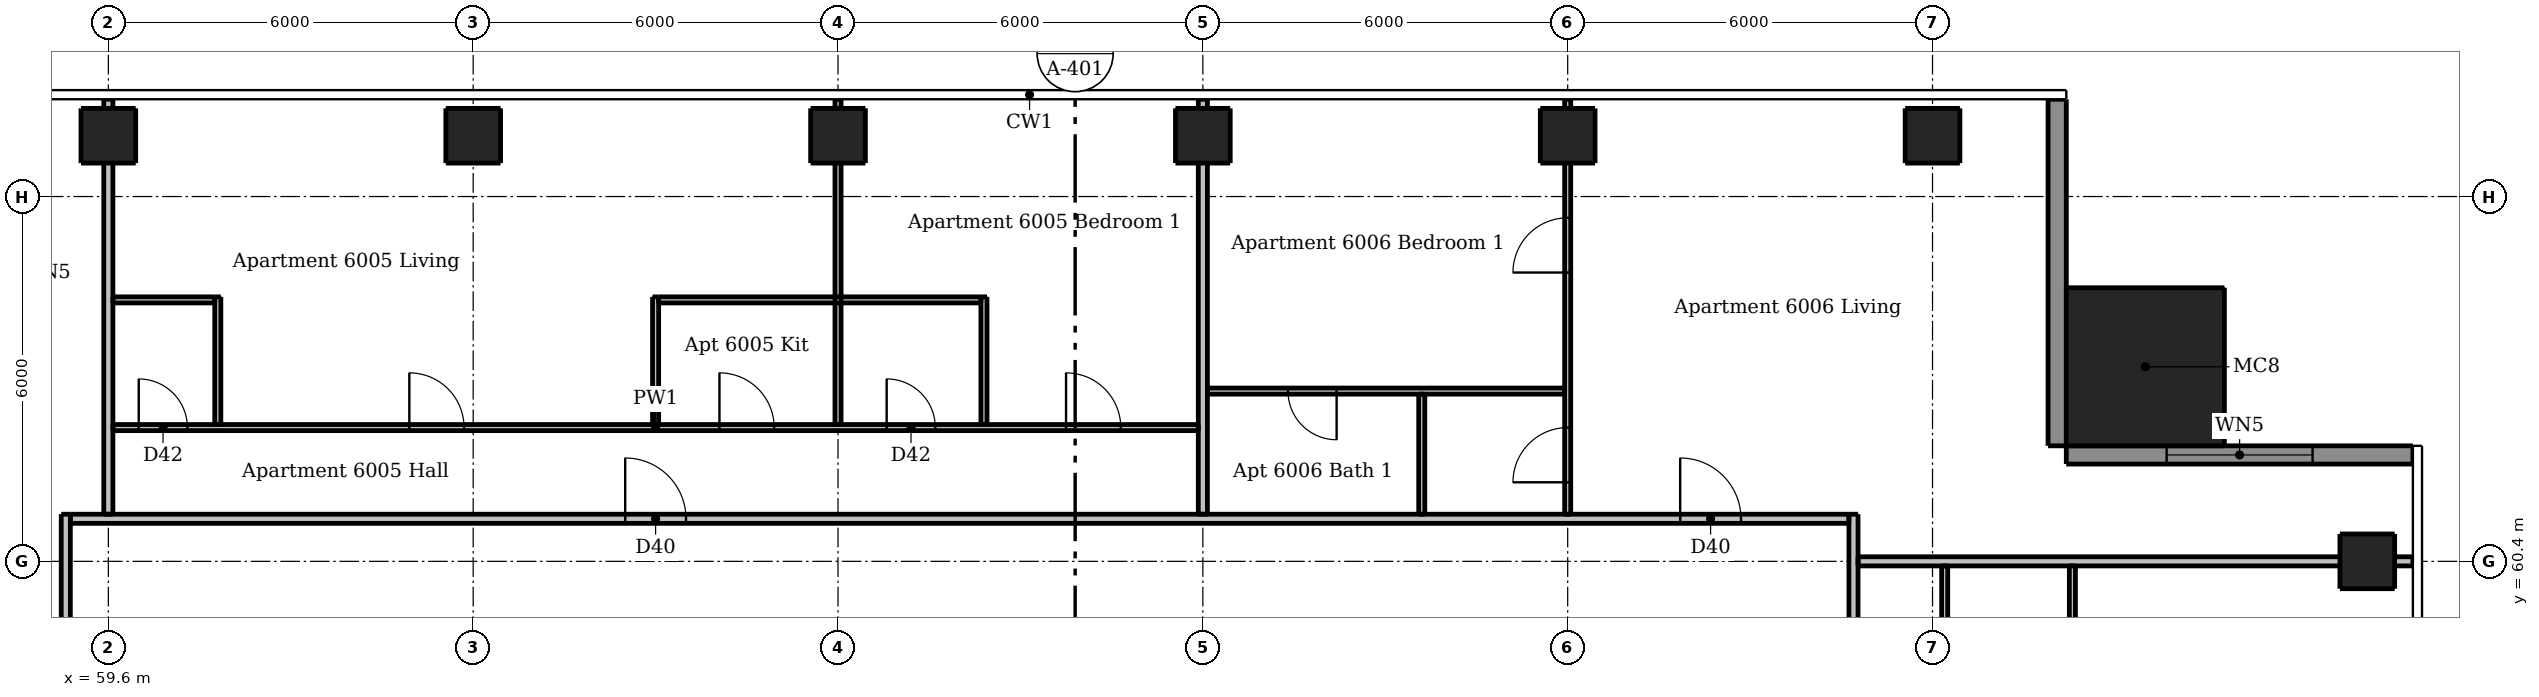
"""IFC4 building model, lengths in metres.
Left out: names, types, materials, properties, quantities, classifications, styles, units other than length and angle.
Written with IfcOpenShell. Run it as: python <this file> out.ifc"""

import sys

from ifc_helpers import new_model, si_unit, direction, frame, frame_2d, origin, origin_2d, place, context, subcontext, project, spatial, rectangle, extrude, element, fill, save


model = new_model("IFC4")
c1 = context("Model", 3, precision=1e-05, world=origin(), true_north=direction((0.0, 1.0)))
c2 = subcontext(c1, "Body", "Model", "MODEL_VIEW")
j1 = project(units=[si_unit("LENGTHUNIT", "METRE"), si_unit("PLANEANGLEUNIT", "RADIAN")], contexts=[c1])
p1 = place(None, origin())
s1 = spatial("IfcSite", under=j1, at=p1, CompositionType="ELEMENT")
p2 = place(p1, origin())
s2 = spatial("IfcBuilding", under=s1, at=p2, CompositionType="ELEMENT")
p3 = place(p2, frame((0.0, 0.0, 223.3)))
s3 = spatial("IfcBuildingStorey", under=s2, at=p3, CompositionType="ELEMENT", Elevation=223.3)
for number, where, z_axis, x_axis in (
    (1, (96.75, 60.4, 0.0), (0.0, 0.0, 1.0), (1.0, 0.0, 0.0)),
    (2, (59.6, 67.4, 0.0), (0.0, 0.0, 1.0), (1.0, 0.0, 0.0)),
    (3, (65.6, 67.4, 0.0), (0.0, 0.0, 1.0), (1.0, 0.0, 0.0)),
    (4, (71.6, 67.4, 0.0), (0.0, 0.0, 1.0), (1.0, 0.0, 0.0)),
    (5, (77.6, 67.4, 0.0), (0.0, 0.0, 1.0), (1.0, 0.0, 0.0)),
    (6, (83.6, 67.4, 0.0), (0.0, 0.0, 1.0), (1.0, 0.0, 0.0)),
    (7, (89.6, 67.4, 0.0), (0.0, 0.0, 1.0), (1.0, 0.0, 0.0)),
):
    element("IfcColumn", number, at=place(p3, frame(where, z_axis=z_axis, x_axis=x_axis)), inside=s3, PredefinedType="COLUMN", context=c2, shape_type="SweptSolid", body=[
        extrude(rectangle(XDim=0.9, YDim=0.9, at=origin_2d()), origin(), (0.0, 0.0, 1.0), 3.05),
    ])
p4 = place(p3, frame((93.1, 63.6, 0.0), z_axis=(0.0, 0.0, 1.0), x_axis=(1.0, 0.0, 0.0)))
e8 = element("IfcColumn", 8, at=p4, inside=s3, PredefinedType="COLUMN", context=c2, shape_type="SweptSolid", body=[
    extrude(rectangle(XDim=2.6, YDim=2.6, at=origin_2d()), origin(), (0.0, 0.0, 1.0), 3.3),
])
p5 = place(p3, frame((97.5, 62.15, 0.0), z_axis=(0.0, 0.0, 1.0), x_axis=(-1.0, 0.0, 0.0)))
e9 = element("IfcWall", 9, at=p5, inside=s3, PredefinedType="SOLIDWALL", context=c2, shape_type="SweptSolid", body=[
    extrude(rectangle(XDim=5.7, YDim=0.3, at=frame_2d((2.85, 0.0))), origin(), (0.0, 0.0, 1.0), 3.05),
])
p6 = place(p5, frame((1.65, 0.0, 0.15)))
e10 = element("IfcOpeningElement", 10, at=p6, cuts=e9, PredefinedType="OPENING", context=c2, shape_type="SweptSolid", body=[
    extrude(rectangle(XDim=2.4, YDim=2.1, at=frame_2d((1.2, 1.05))), frame((0.0, 0.16, 0.0), z_axis=(0.0, -1.0, 0.0), x_axis=(1.0, 0.0, 0.0)), (0.0, 0.0, 1.0), 0.32),
])
p7 = place(p3, frame((91.65, 62.3, 0.0), z_axis=(0.0, 0.0, 1.0), x_axis=(0.0, 1.0, 0.0)))
e11 = element("IfcWall", 11, at=p7, inside=s3, PredefinedType="SOLIDWALL", context=c2, shape_type="SweptSolid", body=[
    extrude(rectangle(XDim=5.7, YDim=0.3, at=frame_2d((2.85, 0.0))), origin(), (0.0, 0.0, 1.0), 3.05),
])
for number, where, z_axis, x_axis in (
    (12, (61.4, 62.65, 0.0), (0.0, 0.0, 1.0), (0.0, 1.0, 0.0)),
    (13, (68.6, 62.65, 0.0), (0.0, 0.0, 1.0), (0.0, 1.0, 0.0)),
):
    element("IfcWall", number, at=place(p3, frame(where, z_axis=z_axis, x_axis=x_axis)), inside=s3, PredefinedType="PARTITIONING", context=c2, shape_type="SweptSolid", body=[
        extrude(rectangle(XDim=2.1, YDim=0.1, at=frame_2d((1.05, 0.0))), origin(), (0.0, 0.0, 1.0), 3.05),
    ])
p8 = place(p3, frame((71.6, 62.65, 0.0), z_axis=(0.0, 0.0, 1.0), x_axis=(0.0, 1.0, 0.0)))
e14 = element("IfcWall", 14, at=p8, inside=s3, PredefinedType="PARTITIONING", context=c2, shape_type="SweptSolid", body=[
    extrude(rectangle(XDim=5.35, YDim=0.1, at=frame_2d((2.675, 0.0))), origin(), (0.0, 0.0, 1.0), 2.516),
])
p9 = place(p3, frame((74.0, 62.65, 0.0), z_axis=(0.0, 0.0, 1.0), x_axis=(0.0, 1.0, 0.0)))
e15 = element("IfcWall", 15, at=p9, inside=s3, PredefinedType="PARTITIONING", context=c2, shape_type="SweptSolid", body=[
    extrude(rectangle(XDim=2.1, YDim=0.1, at=frame_2d((1.05, 0.0))), origin(), (0.0, 0.0, 1.0), 3.05),
])
p10 = place(p3, frame((81.2, 61.175, 0.0), z_axis=(0.0, 0.0, 1.0), x_axis=(0.0, 1.0, 0.0)))
e16 = element("IfcWall", 16, at=p10, inside=s3, PredefinedType="PARTITIONING", context=c2, shape_type="SweptSolid", body=[
    extrude(rectangle(XDim=1.975, YDim=0.1, at=frame_2d((0.987, 0.0))), origin(), (0.0, 0.0, 1.0), 3.05),
])
p11 = place(p3, frame((83.6, 61.175, 0.0), z_axis=(0.0, 0.0, 1.0), x_axis=(0.0, 1.0, 0.0)))
e17 = element("IfcWall", 17, at=p11, inside=s3, PredefinedType="PARTITIONING", context=c2, shape_type="SweptSolid", body=[
    extrude(rectangle(XDim=6.825, YDim=0.1, at=frame_2d((3.413, 0.0))), origin(), (0.0, 0.0, 1.0), 2.516),
])
p12 = place(p11, frame((0.525, 0.0, 0.0)))
e18 = element("IfcOpeningElement", 18, at=p12, cuts=e17, PredefinedType="OPENING", context=c2, shape_type="SweptSolid", body=[
    extrude(rectangle(XDim=0.9, YDim=2.1, at=frame_2d((0.45, 1.05))), frame((0.0, 0.06, 0.0), z_axis=(0.0, -1.0, 0.0), x_axis=(1.0, 0.0, 0.0)), (0.0, 0.0, 1.0), 0.12),
])
p13 = place(p11, frame((3.975, 0.0, 0.0)))
e19 = element("IfcOpeningElement", 19, at=p13, cuts=e17, PredefinedType="OPENING", context=c2, shape_type="SweptSolid", body=[
    extrude(rectangle(XDim=0.9, YDim=2.1, at=frame_2d((0.45, 1.05))), frame((0.0, 0.06, 0.0), z_axis=(0.0, -1.0, 0.0), x_axis=(1.0, 0.0, 0.0)), (0.0, 0.0, 1.0), 0.12),
])
p14 = place(p3, frame((89.8, 60.325, 0.0), z_axis=(0.0, 0.0, 1.0), x_axis=(0.0, -1.0, 0.0)))
e20 = element("IfcWall", 20, at=p14, inside=s3, PredefinedType="PARTITIONING", context=c2, shape_type="SweptSolid", body=[
    extrude(rectangle(XDim=20.85, YDim=0.1, at=frame_2d((10.425, 0.0))), origin(), (0.0, 0.0, 1.0), 3.05),
])
p15 = place(p14, frame((6.075, 0.0, 0.0)))
e21 = element("IfcOpeningElement", 21, at=p15, cuts=e20, PredefinedType="OPENING", context=c2, shape_type="SweptSolid", body=[
    extrude(rectangle(XDim=0.9, YDim=2.1, at=frame_2d((0.45, 1.05))), frame((0.0, 0.06, 0.0), z_axis=(0.0, -1.0, 0.0), x_axis=(1.0, 0.0, 0.0)), (0.0, 0.0, 1.0), 0.12),
])
p16 = place(p14, frame((0.975, 0.0, 0.0)))
e22 = element("IfcOpeningElement", 22, at=p16, cuts=e20, PredefinedType="OPENING", context=c2, shape_type="SweptSolid", body=[
    extrude(rectangle(XDim=0.9, YDim=2.1, at=frame_2d((0.45, 1.05))), frame((0.0, 0.06, 0.0), z_axis=(0.0, -1.0, 0.0), x_axis=(1.0, 0.0, 0.0)), (0.0, 0.0, 1.0), 0.12),
])
p17 = place(p14, frame((10.625, 0.0, 0.0)))
e23 = element("IfcOpeningElement", 23, at=p17, cuts=e20, PredefinedType="OPENING", context=c2, shape_type="SweptSolid", body=[
    extrude(rectangle(XDim=0.8, YDim=2.1, at=frame_2d((0.4, 1.05))), frame((0.0, 0.06, 0.0), z_axis=(0.0, -1.0, 0.0), x_axis=(1.0, 0.0, 0.0)), (0.0, 0.0, 1.0), 0.12),
])
p18 = place(p14, frame((18.975, 0.0, 0.0)))
e24 = element("IfcOpeningElement", 24, at=p18, cuts=e20, PredefinedType="OPENING", context=c2, shape_type="SweptSolid", body=[
    extrude(rectangle(XDim=0.9, YDim=2.1, at=frame_2d((0.45, 1.05))), frame((0.0, 0.06, 0.0), z_axis=(0.0, -1.0, 0.0), x_axis=(1.0, 0.0, 0.0)), (0.0, 0.0, 1.0), 0.12),
])
p19 = place(p14, frame((15.675, 0.0, 0.0)))
e25 = element("IfcOpeningElement", 25, at=p19, cuts=e20, PredefinedType="OPENING", context=c2, shape_type="SweptSolid", body=[
    extrude(rectangle(XDim=0.9, YDim=2.1, at=frame_2d((0.45, 1.05))), frame((0.0, 0.06, 0.0), z_axis=(0.0, -1.0, 0.0), x_axis=(1.0, 0.0, 0.0)), (0.0, 0.0, 1.0), 0.12),
])
p20 = place(p14, frame((12.725, 0.0, 0.0)))
e26 = element("IfcOpeningElement", 26, at=p20, cuts=e20, PredefinedType="OPENING", context=c2, shape_type="SweptSolid", body=[
    extrude(rectangle(XDim=0.8, YDim=2.1, at=frame_2d((0.4, 1.05))), frame((0.0, 0.06, 0.0), z_axis=(0.0, -1.0, 0.0), x_axis=(1.0, 0.0, 0.0)), (0.0, 0.0, 1.0), 0.12),
])
p21 = place(p3, frame((91.9, 57.35, 0.0), z_axis=(0.0, 0.0, 1.0), x_axis=(0.0, 1.0, 0.0)))
e27 = element("IfcWall", 27, at=p21, inside=s3, PredefinedType="PARTITIONING", context=c2, shape_type="SweptSolid", body=[
    extrude(rectangle(XDim=2.975, YDim=0.1, at=frame_2d((1.487, 0.0))), origin(), (0.0, 0.0, 1.0), 3.05),
])
p22 = place(p3, frame((59.675, 64.7, 0.0), z_axis=(0.0, 0.0, 1.0), x_axis=(1.0, 0.0, 0.0)))
e28 = element("IfcWall", 28, at=p22, inside=s3, PredefinedType="PARTITIONING", context=c2, shape_type="SweptSolid", body=[
    extrude(rectangle(XDim=1.675, YDim=0.1, at=frame_2d((0.837, 0.0))), origin(), (0.0, 0.0, 1.0), 3.05),
])
p23 = place(p3, frame((68.65, 64.7, 0.0), z_axis=(0.0, 0.0, 1.0), x_axis=(1.0, 0.0, 0.0)))
e29 = element("IfcWall", 29, at=p23, inside=s3, PredefinedType="PARTITIONING", context=c2, shape_type="SweptSolid", body=[
    extrude(rectangle(XDim=5.3, YDim=0.1, at=frame_2d((2.65, 0.0))), origin(), (0.0, 0.0, 1.0), 3.05),
])
p24 = place(p3, frame((83.55, 63.2, 0.0), z_axis=(0.0, 0.0, 1.0), x_axis=(-1.0, 0.0, 0.0)))
e30 = element("IfcWall", 30, at=p24, inside=s3, PredefinedType="PARTITIONING", context=c2, shape_type="SweptSolid", body=[
    extrude(rectangle(XDim=5.875, YDim=0.1, at=frame_2d((2.938, 0.0))), origin(), (0.0, 0.0, 1.0), 3.05),
])
p25 = place(p24, frame((3.75, 0.0, 0.0)))
e31 = element("IfcOpeningElement", 31, at=p25, cuts=e30, PredefinedType="OPENING", context=c2, shape_type="SweptSolid", body=[
    extrude(rectangle(XDim=0.8, YDim=2.1, at=frame_2d((0.4, 1.05))), frame((0.0, 0.06, 0.0), z_axis=(0.0, -1.0, 0.0), x_axis=(1.0, 0.0, 0.0)), (0.0, 0.0, 1.0), 0.12),
])
p26 = place(p3, frame((59.675, 62.6, 0.0), z_axis=(0.0, 0.0, 1.0), x_axis=(1.0, 0.0, 0.0)))
e32 = element("IfcWall", 32, at=p26, inside=s3, PredefinedType="PARTITIONING", context=c2, shape_type="SweptSolid", body=[
    extrude(rectangle(XDim=17.85, YDim=0.1, at=frame_2d((8.925, 0.0))), origin(), (0.0, 0.0, 1.0), 3.05),
])
p27 = place(p26, frame((4.875, 0.0, 0.0)))
e33 = element("IfcOpeningElement", 33, at=p27, cuts=e32, PredefinedType="OPENING", context=c2, shape_type="SweptSolid", body=[
    extrude(rectangle(XDim=0.9, YDim=2.1, at=frame_2d((0.45, 1.05))), frame((0.0, 0.06, 0.0), z_axis=(0.0, -1.0, 0.0), x_axis=(1.0, 0.0, 0.0)), (0.0, 0.0, 1.0), 0.12),
])
p28 = place(p26, frame((9.975, 0.0, 0.0)))
e34 = element("IfcOpeningElement", 34, at=p28, cuts=e32, PredefinedType="OPENING", context=c2, shape_type="SweptSolid", body=[
    extrude(rectangle(XDim=0.9, YDim=2.1, at=frame_2d((0.45, 1.05))), frame((0.0, 0.06, 0.0), z_axis=(0.0, -1.0, 0.0), x_axis=(1.0, 0.0, 0.0)), (0.0, 0.0, 1.0), 0.12),
])
p29 = place(p26, frame((0.425, 0.0, 0.0)))
e35 = element("IfcOpeningElement", 35, at=p29, cuts=e32, PredefinedType="OPENING", context=c2, shape_type="SweptSolid", body=[
    extrude(rectangle(XDim=0.8, YDim=2.1, at=frame_2d((0.4, 1.05))), frame((0.0, 0.06, 0.0), z_axis=(0.0, -1.0, 0.0), x_axis=(1.0, 0.0, 0.0)), (0.0, 0.0, 1.0), 0.12),
])
p30 = place(p26, frame((15.675, 0.0, 0.0)))
e36 = element("IfcOpeningElement", 36, at=p30, cuts=e32, PredefinedType="OPENING", context=c2, shape_type="SweptSolid", body=[
    extrude(rectangle(XDim=0.9, YDim=2.1, at=frame_2d((0.45, 1.05))), frame((0.0, 0.06, 0.0), z_axis=(0.0, -1.0, 0.0), x_axis=(1.0, 0.0, 0.0)), (0.0, 0.0, 1.0), 0.12),
])
p31 = place(p26, frame((12.725, 0.0, 0.0)))
e37 = element("IfcOpeningElement", 37, at=p31, cuts=e32, PredefinedType="OPENING", context=c2, shape_type="SweptSolid", body=[
    extrude(rectangle(XDim=0.8, YDim=2.1, at=frame_2d((0.4, 1.05))), frame((0.0, 0.06, 0.0), z_axis=(0.0, -1.0, 0.0), x_axis=(1.0, 0.0, 0.0)), (0.0, 0.0, 1.0), 0.12),
])
p32 = place(p3, frame((58.9, 30.325, 0.0), z_axis=(0.0, 0.0, 1.0), x_axis=(0.0, 1.0, 0.0)))
e38 = element("IfcWall", 38, at=p32, inside=s3, PredefinedType="PARTITIONING", context=c2, shape_type="SweptSolid", body=[
    extrude(rectangle(XDim=30.85, YDim=0.15, at=frame_2d((15.425, 0.0))), origin(), (0.0, 0.0, 1.0), 3.05),
])
p33 = place(p32, frame((9.225, 0.0, 0.0)))
e39 = element("IfcOpeningElement", 39, at=p33, cuts=e38, PredefinedType="OPENING", context=c2, shape_type="SweptSolid", body=[
    extrude(rectangle(XDim=1.0, YDim=2.1, at=frame_2d((0.5, 1.05))), frame((0.0, 0.085, 0.0), z_axis=(0.0, -1.0, 0.0), x_axis=(1.0, 0.0, 0.0)), (0.0, 0.0, 1.0), 0.17),
])
p34 = place(p32, frame((26.925, 0.0, 0.0)))
e40 = element("IfcOpeningElement", 40, at=p34, cuts=e38, PredefinedType="OPENING", context=c2, shape_type="SweptSolid", body=[
    extrude(rectangle(XDim=1.0, YDim=2.1, at=frame_2d((0.5, 1.05))), frame((0.0, 0.085, 0.0), z_axis=(0.0, -1.0, 0.0), x_axis=(1.0, 0.0, 0.0)), (0.0, 0.0, 1.0), 0.17),
])
p35 = place(p3, frame((59.6, 61.175, 0.0), z_axis=(0.0, 0.0, 1.0), x_axis=(0.0, 1.0, 0.0)))
e41 = element("IfcWall", 41, at=p35, inside=s3, PredefinedType="PARTITIONING", context=c2, shape_type="SweptSolid", body=[
    extrude(rectangle(XDim=6.825, YDim=0.15, at=frame_2d((3.413, 0.0))), origin(), (0.0, 0.0, 1.0), 2.51),
])
p36 = place(p3, frame((77.6, 61.175, 0.0), z_axis=(0.0, 0.0, 1.0), x_axis=(0.0, 1.0, 0.0)))
e42 = element("IfcWall", 42, at=p36, inside=s3, PredefinedType="PARTITIONING", context=c2, shape_type="SweptSolid", body=[
    extrude(rectangle(XDim=6.825, YDim=0.15, at=frame_2d((3.413, 0.0))), origin(), (0.0, 0.0, 1.0), 2.516),
])
p37 = place(p3, frame((88.3, 61.175, 0.0), z_axis=(0.0, 0.0, 1.0), x_axis=(0.0, -1.0, 0.0)))
e43 = element("IfcWall", 43, at=p37, inside=s3, PredefinedType="PARTITIONING", context=c2, shape_type="SweptSolid", body=[
    extrude(rectangle(XDim=29.4, YDim=0.15, at=frame_2d((14.7, 0.0))), origin(), (0.0, 0.0, 1.0), 3.05),
])
p38 = place(p37, frame((28.125, 0.0, 0.0)))
e44 = element("IfcOpeningElement", 44, at=p38, cuts=e43, PredefinedType="OPENING", context=c2, shape_type="SweptSolid", body=[
    extrude(rectangle(XDim=1.0, YDim=2.1, at=frame_2d((0.5, 1.05))), frame((0.0, 0.085, 0.0), z_axis=(0.0, -1.0, 0.0), x_axis=(1.0, 0.0, 0.0)), (0.0, 0.0, 1.0), 0.17),
])
p39 = place(p37, frame((10.775, 0.0, 0.0)))
e45 = element("IfcOpeningElement", 45, at=p39, cuts=e43, PredefinedType="OPENING", context=c2, shape_type="SweptSolid", body=[
    extrude(rectangle(XDim=1.0, YDim=2.1, at=frame_2d((0.5, 1.05))), frame((0.0, 0.085, 0.0), z_axis=(0.0, -1.0, 0.0), x_axis=(1.0, 0.0, 0.0)), (0.0, 0.0, 1.0), 0.17),
])
p40 = place(p3, frame((58.975, 61.1, 0.0), z_axis=(0.0, 0.0, 1.0), x_axis=(1.0, 0.0, 0.0)))
e46 = element("IfcWall", 46, at=p40, inside=s3, PredefinedType="PARTITIONING", context=c2, shape_type="SweptSolid", body=[
    extrude(rectangle(XDim=29.25, YDim=0.15, at=frame_2d((14.625, 0.0))), origin(), (0.0, 0.0, 1.0), 3.05),
])
p41 = place(p40, frame((9.125, 0.0, 0.0)))
e47 = element("IfcOpeningElement", 47, at=p41, cuts=e46, PredefinedType="OPENING", context=c2, shape_type="SweptSolid", body=[
    extrude(rectangle(XDim=1.0, YDim=2.1, at=frame_2d((0.5, 1.05))), frame((0.0, 0.085, 0.0), z_axis=(0.0, -1.0, 0.0), x_axis=(1.0, 0.0, 0.0)), (0.0, 0.0, 1.0), 0.17),
])
p42 = place(p40, frame((26.475, 0.0, 0.0)))
e48 = element("IfcOpeningElement", 48, at=p42, cuts=e46, PredefinedType="OPENING", context=c2, shape_type="SweptSolid", body=[
    extrude(rectangle(XDim=1.0, YDim=2.1, at=frame_2d((0.5, 1.05))), frame((0.0, 0.085, 0.0), z_axis=(0.0, -1.0, 0.0), x_axis=(1.0, 0.0, 0.0)), (0.0, 0.0, 1.0), 0.17),
])
p43 = place(p3, frame((88.375, 60.4, 0.0), z_axis=(0.0, 0.0, 1.0), x_axis=(1.0, 0.0, 0.0)))
e49 = element("IfcWall", 49, at=p43, inside=s3, PredefinedType="PARTITIONING", context=c2, shape_type="SweptSolid", body=[
    extrude(rectangle(XDim=9.125, YDim=0.15, at=frame_2d((4.562, 0.0))), origin(), (0.0, 0.0, 1.0), 2.59),
])
p44 = place(p6, origin())
e50 = element("IfcWindow", 50, at=p44, inside=s3, PartitioningType="DOUBLE_PANEL_VERTICAL", PredefinedType="WINDOW", context=c2, shape_type="SweptSolid", body=[
    extrude(rectangle(XDim=2.4, YDim=2.1, at=frame_2d((1.2, 1.05))), frame((0.0, 0.03, 0.0), z_axis=(0.0, -1.0, 0.0), x_axis=(1.0, 0.0, 0.0)), (0.0, 0.0, 1.0), 0.06),
])
fill(e10, e50)
p45 = place(p41, origin())
e51 = element("IfcDoor", 51, at=p45, inside=s3, OperationType="SINGLE_SWING_LEFT", PredefinedType="DOOR", context=c2, shape_type="SweptSolid", body=[
    extrude(rectangle(XDim=1.0, YDim=2.1, at=frame_2d((0.5, 1.05))), frame((0.0, 0.025, 0.0), z_axis=(0.0, -1.0, 0.0), x_axis=(1.0, 0.0, 0.0)), (0.0, 0.0, 1.0), 0.05),
])
fill(e47, e51)
p46 = place(p27, origin())
e52 = element("IfcDoor", 52, at=p46, inside=s3, OperationType="SINGLE_SWING_LEFT", PredefinedType="DOOR", context=c2, shape_type="SweptSolid", body=[
    extrude(rectangle(XDim=0.9, YDim=2.1, at=frame_2d((0.45, 1.05))), frame((0.0, 0.025, 0.0), z_axis=(0.0, -1.0, 0.0), x_axis=(1.0, 0.0, 0.0)), (0.0, 0.0, 1.0), 0.05),
])
fill(e33, e52)
p47 = place(p28, origin())
e53 = element("IfcDoor", 53, at=p47, inside=s3, OperationType="SINGLE_SWING_LEFT", PredefinedType="DOOR", context=c2, shape_type="SweptSolid", body=[
    extrude(rectangle(XDim=0.9, YDim=2.1, at=frame_2d((0.45, 1.05))), frame((0.0, 0.025, 0.0), z_axis=(0.0, -1.0, 0.0), x_axis=(1.0, 0.0, 0.0)), (0.0, 0.0, 1.0), 0.05),
])
fill(e34, e53)
p48 = place(p29, origin())
e54 = element("IfcDoor", 54, at=p48, inside=s3, OperationType="SINGLE_SWING_LEFT", PredefinedType="DOOR", context=c2, shape_type="SweptSolid", body=[
    extrude(rectangle(XDim=0.8, YDim=2.1, at=frame_2d((0.4, 1.05))), frame((0.0, 0.025, 0.0), z_axis=(0.0, -1.0, 0.0), x_axis=(1.0, 0.0, 0.0)), (0.0, 0.0, 1.0), 0.05),
])
fill(e35, e54)
p49 = place(p30, origin())
e55 = element("IfcDoor", 55, at=p49, inside=s3, OperationType="SINGLE_SWING_LEFT", PredefinedType="DOOR", context=c2, shape_type="SweptSolid", body=[
    extrude(rectangle(XDim=0.9, YDim=2.1, at=frame_2d((0.45, 1.05))), frame((0.0, 0.025, 0.0), z_axis=(0.0, -1.0, 0.0), x_axis=(1.0, 0.0, 0.0)), (0.0, 0.0, 1.0), 0.05),
])
fill(e36, e55)
p50 = place(p31, origin())
e56 = element("IfcDoor", 56, at=p50, inside=s3, OperationType="SINGLE_SWING_LEFT", PredefinedType="DOOR", context=c2, shape_type="SweptSolid", body=[
    extrude(rectangle(XDim=0.8, YDim=2.1, at=frame_2d((0.4, 1.05))), frame((0.0, 0.025, 0.0), z_axis=(0.0, -1.0, 0.0), x_axis=(1.0, 0.0, 0.0)), (0.0, 0.0, 1.0), 0.05),
])
fill(e37, e56)
p51 = place(p42, origin())
e57 = element("IfcDoor", 57, at=p51, inside=s3, OperationType="SINGLE_SWING_LEFT", PredefinedType="DOOR", context=c2, shape_type="SweptSolid", body=[
    extrude(rectangle(XDim=1.0, YDim=2.1, at=frame_2d((0.5, 1.05))), frame((0.0, 0.025, 0.0), z_axis=(0.0, -1.0, 0.0), x_axis=(1.0, 0.0, 0.0)), (0.0, 0.0, 1.0), 0.05),
])
fill(e48, e57)
p52 = place(p12, origin())
e58 = element("IfcDoor", 58, at=p52, inside=s3, OperationType="SINGLE_SWING_LEFT", PredefinedType="DOOR", context=c2, shape_type="SweptSolid", body=[
    extrude(rectangle(XDim=0.9, YDim=2.1, at=frame_2d((0.45, 1.05))), frame((0.0, 0.025, 0.0), z_axis=(0.0, -1.0, 0.0), x_axis=(1.0, 0.0, 0.0)), (0.0, 0.0, 1.0), 0.05),
])
fill(e18, e58)
p53 = place(p13, origin())
e59 = element("IfcDoor", 59, at=p53, inside=s3, OperationType="SINGLE_SWING_LEFT", PredefinedType="DOOR", context=c2, shape_type="SweptSolid", body=[
    extrude(rectangle(XDim=0.9, YDim=2.1, at=frame_2d((0.45, 1.05))), frame((0.0, 0.025, 0.0), z_axis=(0.0, -1.0, 0.0), x_axis=(1.0, 0.0, 0.0)), (0.0, 0.0, 1.0), 0.05),
])
fill(e19, e59)
p54 = place(p25, origin())
e60 = element("IfcDoor", 60, at=p54, inside=s3, OperationType="SINGLE_SWING_LEFT", PredefinedType="DOOR", context=c2, shape_type="SweptSolid", body=[
    extrude(rectangle(XDim=0.8, YDim=2.1, at=frame_2d((0.4, 1.05))), frame((0.0, 0.025, 0.0), z_axis=(0.0, -1.0, 0.0), x_axis=(1.0, 0.0, 0.0)), (0.0, 0.0, 1.0), 0.05),
])
fill(e31, e60)
save(model, sys.argv[1])
